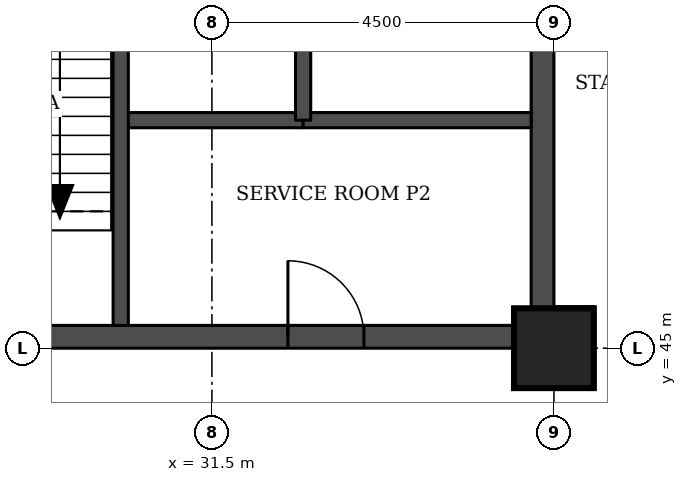
"""IFC4 building model, lengths in metres.
Left out: names, types, materials, properties, quantities, classifications, styles, units other than length and angle.
Written with IfcOpenShell. Run it as: python <this file> out.ifc"""

import sys

from ifc_helpers import new_model, si_unit, direction, frame, frame_2d, origin, origin_2d, place, context, subcontext, project, spatial, rectangle, extrude, element, fill, save


model = new_model("IFC4")
c1 = context("Model", 3, precision=1e-05, world=origin(), true_north=direction((0.0, 1.0)))
c2 = subcontext(c1, "Body", "Model", "MODEL_VIEW")
j1 = project(units=[si_unit("LENGTHUNIT", "METRE"), si_unit("PLANEANGLEUNIT", "RADIAN")], contexts=[c1])
p1 = place(None, origin())
s1 = spatial("IfcSite", under=j1, at=p1, CompositionType="ELEMENT")
p2 = place(p1, origin())
s2 = spatial("IfcBuilding", under=s1, at=p2, CompositionType="ELEMENT")
p3 = place(p2, frame((0.0, 0.0, 115.9)))
s3 = spatial("IfcBuildingStorey", under=s2, at=p3, CompositionType="ELEMENT", Elevation=115.9)
p4 = place(p3, frame((36.0, 45.0, 0.0), z_axis=(0.0, 0.0, 1.0), x_axis=(1.0, 0.0, 0.0)))
e1 = element("IfcColumn", 1, at=p4, inside=s3, PredefinedType="COLUMN", context=c2, shape_type="SweptSolid", body=[
    extrude(rectangle(XDim=1.05, YDim=1.05, at=origin_2d()), origin(), (0.0, 0.0, 1.0), 3.7),
])
p5 = place(p3, frame((27.3, 45.15, 0.0), z_axis=(0.0, 0.0, 1.0), x_axis=(1.0, 0.0, 0.0)))
e2 = element("IfcWall", 2, at=p5, inside=s3, PredefinedType="SHEAR", context=c2, shape_type="SweptSolid", body=[
    extrude(rectangle(XDim=8.4, YDim=0.3, at=frame_2d((4.2, 0.0))), origin(), (0.0, 0.0, 1.0), 3.7),
])
p6 = place(p5, frame((5.2, 0.0, 0.0)))
e3 = element("IfcOpeningElement", 3, at=p6, cuts=e2, PredefinedType="OPENING", context=c2, shape_type="SweptSolid", body=[
    extrude(rectangle(XDim=1.0, YDim=2.1, at=frame_2d((0.5, 1.05))), frame((0.0, 0.16, 0.0), z_axis=(0.0, -1.0, 0.0), x_axis=(1.0, 0.0, 0.0)), (0.0, 0.0, 1.0), 0.32),
])
p7 = place(p3, frame((35.85, 45.0, 0.0), z_axis=(0.0, 0.0, 1.0), x_axis=(0.0, 1.0, 0.0)))
e4 = element("IfcWall", 4, at=p7, inside=s3, PredefinedType="SHEAR", context=c2, shape_type="SweptSolid", body=[
    extrude(rectangle(XDim=9.0, YDim=0.3, at=frame_2d((4.5, 0.0))), origin(), (0.0, 0.0, 1.0), 3.7),
])
p8 = place(p3, frame((30.3, 48.0, 0.0), z_axis=(0.0, 0.0, 1.0), x_axis=(1.0, 0.0, 0.0)))
e5 = element("IfcWall", 5, at=p8, inside=s3, PredefinedType="SOLIDWALL", context=c2, shape_type="SweptSolid", body=[
    extrude(rectangle(XDim=2.4, YDim=0.2, at=frame_2d((1.2, 0.0))), origin(), (0.0, 0.0, 1.0), 3.55),
])
p9 = place(p3, frame((32.7, 48.0, 0.0), z_axis=(0.0, 0.0, 1.0), x_axis=(1.0, 0.0, 0.0)))
e6 = element("IfcWall", 6, at=p9, inside=s3, PredefinedType="SOLIDWALL", context=c2, shape_type="SweptSolid", body=[
    extrude(rectangle(XDim=3.0, YDim=0.2, at=frame_2d((1.5, 0.0))), origin(), (0.0, 0.0, 1.0), 3.55),
])
for number, where, z_axis, x_axis in (
    (7, (30.3, 45.3, 0.0), (0.0, 0.0, 1.0), (0.0, 1.0, 0.0)),
    (8, (32.7, 48.0, 0.0), (0.0, 0.0, 1.0), (0.0, 1.0, 0.0)),
):
    element("IfcWall", number, at=place(p3, frame(where, z_axis=z_axis, x_axis=x_axis)), inside=s3, PredefinedType="SOLIDWALL", context=c2, shape_type="SweptSolid", body=[
        extrude(rectangle(XDim=5.7, YDim=0.2, at=frame_2d((2.85, 0.0))), origin(), (0.0, 0.0, 1.0), 3.55),
    ])
p10 = place(p6, origin())
e9 = element("IfcDoor", 9, at=p10, inside=s3, OperationType="SINGLE_SWING_LEFT", PredefinedType="DOOR", context=c2, shape_type="SweptSolid", body=[
    extrude(rectangle(XDim=1.0, YDim=2.1, at=frame_2d((0.5, 1.05))), frame((0.0, 0.025, 0.0), z_axis=(0.0, -1.0, 0.0), x_axis=(1.0, 0.0, 0.0)), (0.0, 0.0, 1.0), 0.05),
])
fill(e3, e9)
save(model, sys.argv[1])
